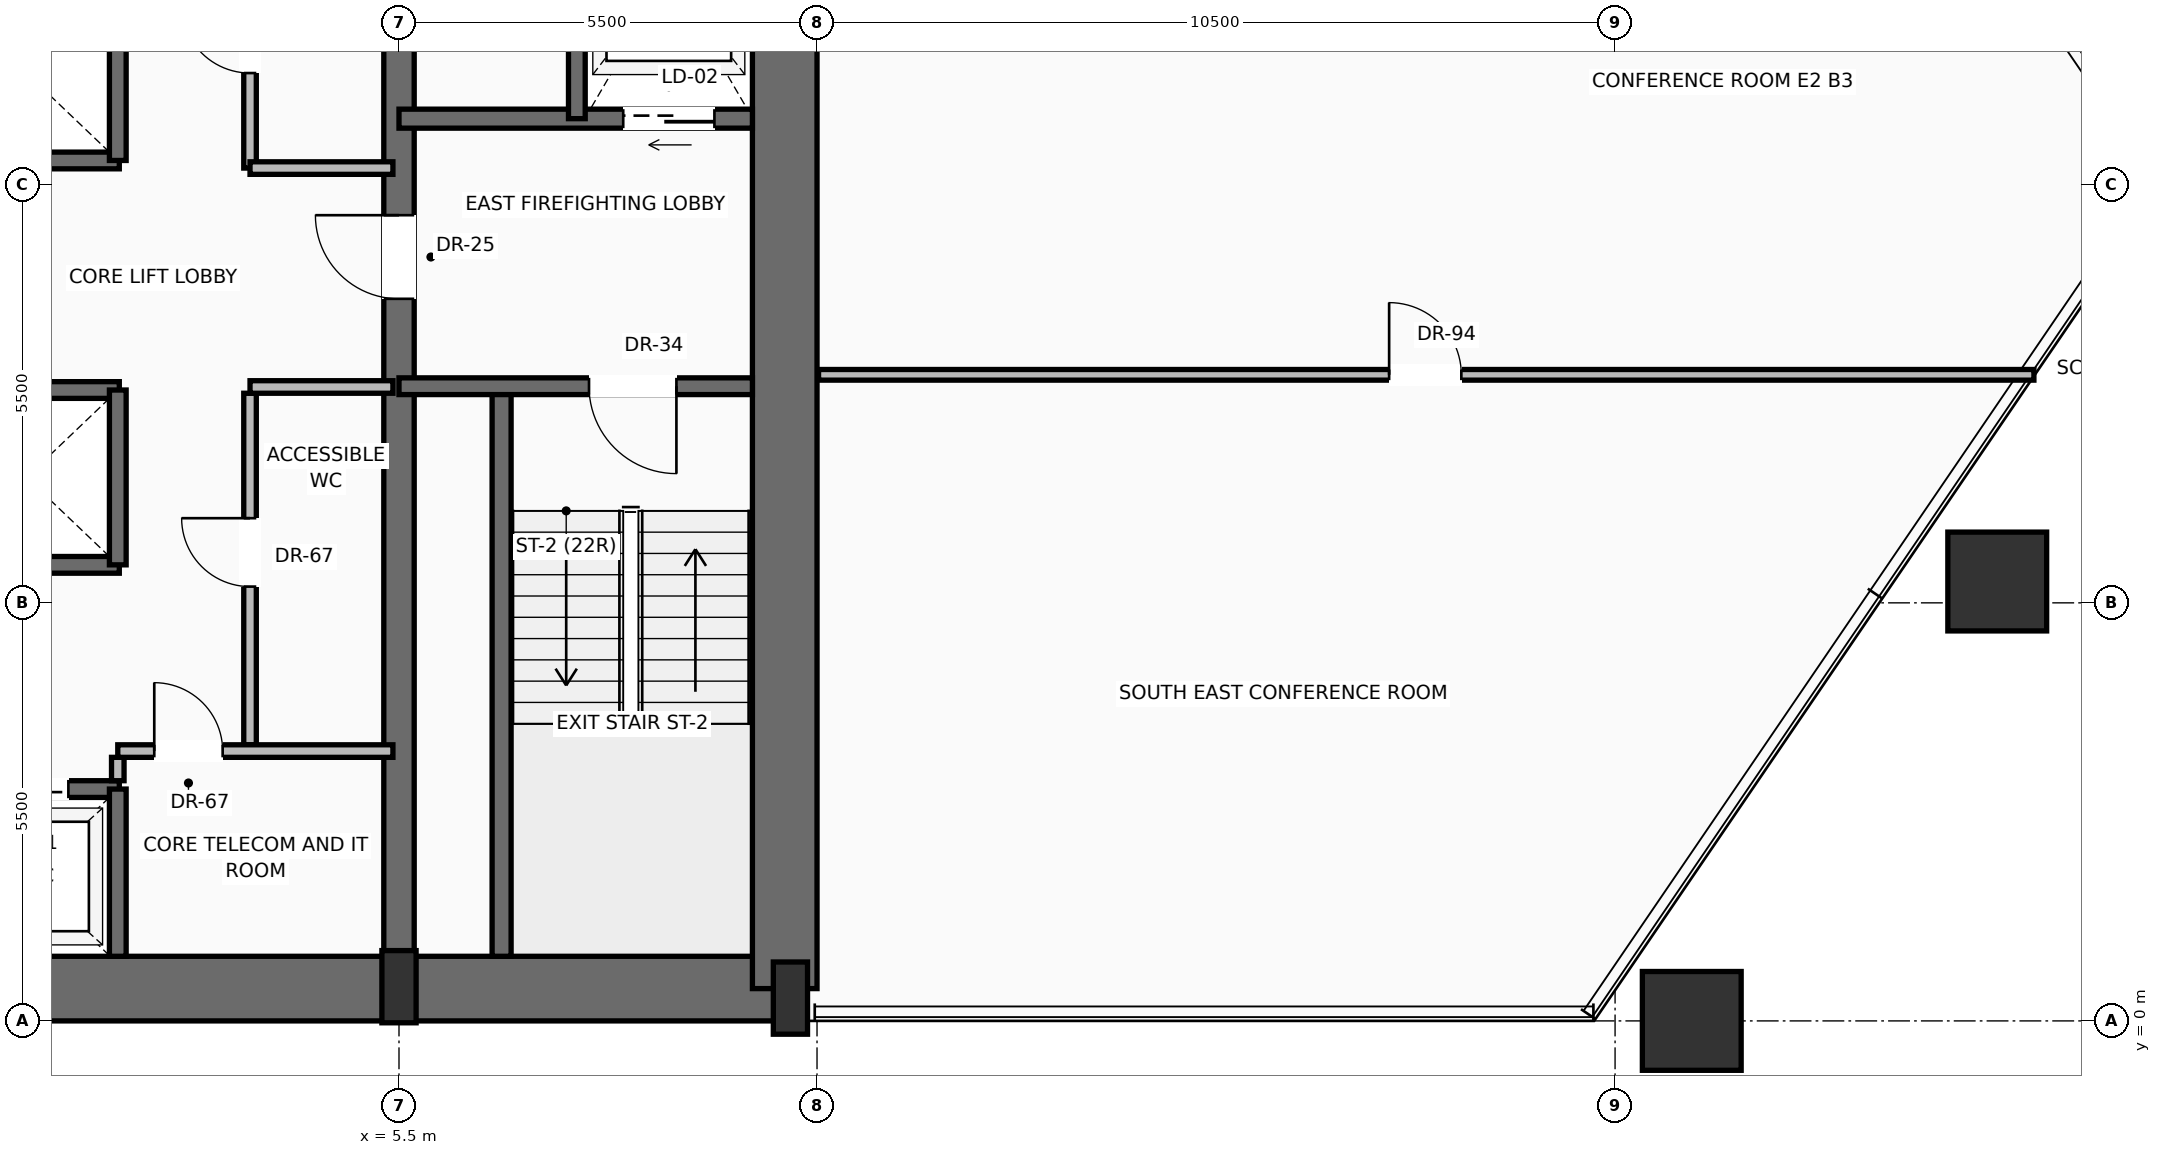
"""IFC4 building model, lengths in metres.
Left out: names, types, materials, properties, quantities, classifications, styles, units other than length and angle.
Written with IfcOpenShell. Run it as: python <this file> out.ifc"""

import sys

from ifc_helpers import new_model, si_unit, direction, frame, frame_2d, origin, origin_2d, place, context, subcontext, project, spatial, rectangle, hollow_rectangle, extrude, source, transform, mapped, element, fill, save


model = new_model("IFC4")
c1 = context("Model", 3, precision=1e-05, world=origin(), true_north=direction((0.0, 1.0)))
c2 = subcontext(c1, "Body", "Model", "MODEL_VIEW")
j1 = project(units=[si_unit("LENGTHUNIT", "METRE"), si_unit("PLANEANGLEUNIT", "RADIAN")], contexts=[c1])
p1 = place(None, origin())
s1 = spatial("IfcSite", under=j1, at=p1, CompositionType="ELEMENT")
p2 = place(p1, origin())
s2 = spatial("IfcBuilding", under=s1, at=p2, CompositionType="ELEMENT")
p3 = place(p2, frame((0.0, 0.0, 31.2)))
s3 = spatial("IfcBuildingStorey", under=s2, at=p3, CompositionType="ELEMENT", Elevation=31.2)
p4 = place(p3, frame((-10.65, 0.425, 0.0), z_axis=(0.0, 0.0, 1.0), x_axis=(1.0, 0.0, 0.0)))
e1 = element("IfcWall", 1, at=p4, inside=s3, PredefinedType="SHEAR", context=c2, shape_type="SweptSolid", body=[
    extrude(rectangle(XDim=21.3, YDim=0.85, at=frame_2d((10.65, 0.0))), origin(), (0.0, 0.0, 1.0), 3.45),
])
p5 = place(p3, frame((10.575, 0.425, 0.0), z_axis=(0.0, 0.0, 1.0), x_axis=(0.0, 1.0, 0.0)))
e2 = element("IfcWall", 2, at=p5, inside=s3, PredefinedType="SHEAR", context=c2, shape_type="SweptSolid", body=[
    extrude(rectangle(XDim=15.75, YDim=0.85, at=frame_2d((7.875, 0.0))), origin(), (0.0, 0.0, 1.0), 3.45),
])
p6 = place(p3, frame((5.5, 0.425, 0.0), z_axis=(0.0, 0.0, 1.0), x_axis=(0.0, 1.0, 0.0)))
e3 = element("IfcWall", 3, at=p6, inside=s3, PredefinedType="SHEAR", context=c2, shape_type="SweptSolid", body=[
    extrude(rectangle(XDim=15.75, YDim=0.4, at=frame_2d((7.875, 0.0))), origin(), (0.0, 0.0, 1.0), 3.45),
])
p7 = place(p6, frame((9.075, 0.0, 0.0)))
e4 = element("IfcOpeningElement", 4, at=p7, cuts=e3, PredefinedType="OPENING", context=c2, shape_type="SweptSolid", body=[
    extrude(rectangle(XDim=1.1, YDim=2.2, at=frame_2d((0.55, 1.1))), frame((0.0, 0.21, 0.0), z_axis=(0.0, -1.0, 0.0), x_axis=(1.0, 0.0, 0.0)), (0.0, 0.0, 1.0), 0.42),
])
m1 = source(origin(), c2, "Body", "SweptSolid", [
    extrude(rectangle(XDim=0.45, YDim=0.95, at=origin_2d()), origin(), (0.0, 0.0, 1.0), 3.7),
])
for number, where, z_axis, x_axis in (
    (5, (5.5, 0.45, 0.0), (0.0, 0.0, 1.0), (1.0, 0.0, 0.0)),
    (6, (10.65, 0.3, 0.0), (0.0, 0.0, 1.0), (1.0, 0.0, 0.0)),
):
    element("IfcColumn", number, at=place(p3, frame(where, z_axis=z_axis, x_axis=x_axis)), inside=s3, PredefinedType="PILASTER", context=c2, shape_type="MappedRepresentation", body=[
        mapped(m1, transform((0.0, 0.0, 0.0), scale=1.0)),
    ])
m2 = source(origin(), c2, "Body", "SweptSolid", [
    extrude(hollow_rectangle(XDim=1.3, YDim=1.3, WallThickness=0.065, at=origin_2d()), origin(), (0.0, 0.0, 1.0), 3.692),
])
for number, where, z_axis, x_axis in (
    (7, (22.509, 0.0, 0.004), (0.017, 0.0, 1.0), (0.0, 1.0, 0.0)),
    (8, (26.528, 5.781, 0.004), (0.005, -0.017, 1.0), (0.961, 0.275, 0.0)),
):
    element("IfcColumn", number, at=place(p3, frame(where, z_axis=z_axis, x_axis=x_axis)), inside=s3, PredefinedType="COLUMN", context=c2, shape_type="MappedRepresentation", body=[
        mapped(m2, transform((0.0, 0.0, 0.0), scale=1.0)),
    ])
p8 = place(p3, frame((6.85, 0.85, 0.0), z_axis=(0.0, 0.0, 1.0), x_axis=(0.0, 1.0, 0.0)))
e9 = element("IfcWall", 9, at=p8, inside=s3, PredefinedType="SOLIDWALL", context=c2, shape_type="SweptSolid", body=[
    extrude(rectangle(XDim=7.5, YDim=0.25, at=frame_2d((3.75, 0.0))), origin(), (0.0, 0.0, 1.0), 3.45),
])
p9 = place(p3, frame((10.15, 8.35, 0.0), z_axis=(0.0, 0.0, 1.0), x_axis=(-1.0, 0.0, 0.0)))
e10 = element("IfcWall", 10, at=p9, inside=s3, PredefinedType="SOLIDWALL", context=c2, shape_type="SweptSolid", body=[
    extrude(rectangle(XDim=4.65, YDim=0.22, at=frame_2d((2.325, 0.0))), origin(), (0.0, 0.0, 1.0), 3.45),
])
p10 = place(p9, frame((1.0, 0.0, 0.0)))
e11 = element("IfcOpeningElement", 11, at=p10, cuts=e10, PredefinedType="OPENING", context=c2, shape_type="SweptSolid", body=[
    extrude(rectangle(XDim=1.15, YDim=2.2, at=frame_2d((0.575, 1.1))), frame((0.0, 0.12, 0.0), z_axis=(0.0, -1.0, 0.0), x_axis=(1.0, 0.0, 0.0)), (0.0, 0.0, 1.0), 0.24),
])
p11 = place(p3, frame((10.15, 11.87, 0.0), z_axis=(0.0, 0.0, 1.0), x_axis=(-1.0, 0.0, 0.0)))
e12 = element("IfcWall", 12, at=p11, inside=s3, PredefinedType="SOLIDWALL", context=c2, shape_type="SweptSolid", body=[
    extrude(rectangle(XDim=4.65, YDim=0.25, at=frame_2d((2.325, 0.0))), origin(), (0.0, 0.0, 1.0), 3.45),
])
p12 = place(p11, frame((0.5, 0.0, 0.0)))
e13 = element("IfcOpeningElement", 13, at=p12, cuts=e12, PredefinedType="OPENING", context=c2, shape_type="SweptSolid", body=[
    extrude(rectangle(XDim=1.2, YDim=2.25, at=frame_2d((0.6, 1.125))), frame((0.0, 0.135, 0.0), z_axis=(0.0, -1.0, 0.0), x_axis=(1.0, 0.0, 0.0)), (0.0, 0.0, 1.0), 0.27),
])
p13 = place(p3, frame((7.84, 11.87, 0.0), z_axis=(0.0, 0.0, 1.0), x_axis=(0.0, 1.0, 0.0)))
e14 = element("IfcWall", 14, at=p13, inside=s3, PredefinedType="SOLIDWALL", context=c2, shape_type="SweptSolid", body=[
    extrude(rectangle(XDim=3.88, YDim=0.22, at=frame_2d((1.94, 0.0))), origin(), (0.0, 0.0, 1.0), 3.45),
])
p14 = place(p3, frame((-5.5, 3.05, 0.0), z_axis=(0.0, 0.0, 1.0), x_axis=(1.0, 0.0, 0.0)))
e15 = element("IfcWall", 15, at=p14, inside=s3, PredefinedType="SOLIDWALL", context=c2, shape_type="SweptSolid", body=[
    extrude(rectangle(XDim=7.32, YDim=0.22, at=frame_2d((3.66, 0.0))), origin(), (0.0, 0.0, 1.0), 3.45),
])
p15 = place(p14, frame((0.75, 0.0, 0.0)))
e16 = element("IfcOpeningElement", 16, at=p15, cuts=e15, PredefinedType="OPENING", context=c2, shape_type="SweptSolid", body=[
    extrude(rectangle(XDim=1.1, YDim=2.2, at=frame_2d((0.55, 1.1))), frame((0.0, 0.12, 0.0), z_axis=(0.0, -1.0, 0.0), x_axis=(1.0, 0.0, 0.0)), (0.0, 0.0, 1.0), 0.24),
])
p16 = place(p14, frame((3.15, 0.0, 0.0)))
e17 = element("IfcOpeningElement", 17, at=p16, cuts=e15, PredefinedType="OPENING", context=c2, shape_type="SweptSolid", body=[
    extrude(rectangle(XDim=1.1, YDim=2.2, at=frame_2d((0.55, 1.1))), frame((0.0, 0.12, 0.0), z_axis=(0.0, -1.0, 0.0), x_axis=(1.0, 0.0, 0.0)), (0.0, 0.0, 1.0), 0.24),
])
p17 = place(p14, frame((5.55, 0.0, 0.0)))
e18 = element("IfcOpeningElement", 18, at=p17, cuts=e15, PredefinedType="OPENING", context=c2, shape_type="SweptSolid", body=[
    extrude(rectangle(XDim=1.1, YDim=2.2, at=frame_2d((0.55, 1.1))), frame((0.0, 0.12, 0.0), z_axis=(0.0, -1.0, 0.0), x_axis=(1.0, 0.0, 0.0)), (0.0, 0.0, 1.0), 0.24),
])
p18 = place(p3, frame((1.8, 0.85, 0.0), z_axis=(0.0, 0.0, 1.0), x_axis=(0.0, 1.0, 0.0)))
e19 = element("IfcWall", 19, at=p18, inside=s3, PredefinedType="SOLIDWALL", context=c2, shape_type="SweptSolid", body=[
    extrude(rectangle(XDim=2.2, YDim=0.22, at=frame_2d((1.1, 0.0))), origin(), (0.0, 0.0, 1.0), 3.45),
])
p19 = place(p3, frame((1.8, 3.16, 0.0), z_axis=(0.0, 0.0, 1.0), x_axis=(0.0, 1.0, 0.0)))
e20 = element("IfcWall", 20, at=p19, inside=s3, PredefinedType="PARTITIONING", context=c2, shape_type="SweptSolid", body=[
    extrude(rectangle(XDim=0.308, YDim=0.165, at=frame_2d((0.154, 0.0))), origin(), (0.0, 0.0, 1.0), 3.442),
])
p20 = place(p3, frame((3.54, 3.633, 0.0), z_axis=(0.0, 0.0, 1.0), x_axis=(0.0, 1.0, 0.0)))
e21 = element("IfcWall", 21, at=p20, inside=s3, PredefinedType="PARTITIONING", context=c2, shape_type="SweptSolid", body=[
    extrude(rectangle(XDim=4.625, YDim=0.165, at=frame_2d((2.312, 0.0))), origin(), (0.0, 0.0, 1.0), 3.442),
])
p21 = place(p20, frame((2.081, 0.0, 0.0)))
e22 = element("IfcOpeningElement", 22, at=p21, cuts=e21, PredefinedType="OPENING", context=c2, shape_type="SweptSolid", body=[
    extrude(rectangle(XDim=0.9, YDim=2.1, at=frame_2d((0.45, 1.05))), frame((0.0, 0.093, 0.0), z_axis=(0.0, -1.0, 0.0), x_axis=(1.0, 0.0, 0.0)), (0.0, 0.0, 1.0), 0.185),
])
p22 = place(p3, frame((3.54, 8.34, 0.0), z_axis=(0.0, 0.0, 1.0), x_axis=(1.0, 0.0, 0.0)))
e23 = element("IfcWall", 23, at=p22, inside=s3, PredefinedType="PARTITIONING", context=c2, shape_type="SweptSolid", body=[
    extrude(rectangle(XDim=1.88, YDim=0.165, at=frame_2d((0.94, 0.0))), origin(), (0.0, 0.0, 1.0), 3.442),
])
p23 = place(p3, frame((1.8, 3.55, 0.0), z_axis=(0.0, 0.0, 1.0), x_axis=(1.0, 0.0, 0.0)))
e24 = element("IfcWall", 24, at=p23, inside=s3, PredefinedType="PARTITIONING", context=c2, shape_type="SweptSolid", body=[
    extrude(rectangle(XDim=3.62, YDim=0.165, at=frame_2d((1.81, 0.0))), origin(), (0.0, 0.0, 1.0), 3.442),
])
p24 = place(p23, frame((0.48, 0.0, 0.0)))
e25 = element("IfcOpeningElement", 25, at=p24, cuts=e24, PredefinedType="OPENING", context=c2, shape_type="SweptSolid", body=[
    extrude(rectangle(XDim=0.9, YDim=2.1, at=frame_2d((0.45, 1.05))), frame((0.0, 0.093, 0.0), z_axis=(0.0, -1.0, 0.0), x_axis=(1.0, 0.0, 0.0)), (0.0, 0.0, 1.0), 0.185),
])
for number, where, z_axis, x_axis in (
    (26, (-5.5, 6.0, 0.0), (0.0, 0.0, 1.0), (1.0, 0.0, 0.0)),
    (27, (-5.5, 8.3, 0.0), (0.0, 0.0, 1.0), (1.0, 0.0, 0.0)),
):
    element("IfcWall", number, at=place(p3, frame(where, z_axis=z_axis, x_axis=x_axis)), inside=s3, PredefinedType="SOLIDWALL", context=c2, shape_type="SweptSolid", body=[
        extrude(rectangle(XDim=7.32, YDim=0.22, at=frame_2d((3.66, 0.0))), origin(), (0.0, 0.0, 1.0), 3.45),
    ])
p25 = place(p3, frame((1.8, 6.0, 0.0), z_axis=(0.0, 0.0, 1.0), x_axis=(0.0, 1.0, 0.0)))
e28 = element("IfcWall", 28, at=p25, inside=s3, PredefinedType="SOLIDWALL", context=c2, shape_type="SweptSolid", body=[
    extrude(rectangle(XDim=2.3, YDim=0.22, at=frame_2d((1.15, 0.0))), origin(), (0.0, 0.0, 1.0), 3.45),
])
p26 = place(p3, frame((-5.5, 11.32, 0.0), z_axis=(0.0, 0.0, 1.0), x_axis=(1.0, 0.0, 0.0)))
e29 = element("IfcWall", 29, at=p26, inside=s3, PredefinedType="SOLIDWALL", context=c2, shape_type="SweptSolid", body=[
    extrude(rectangle(XDim=7.32, YDim=0.22, at=frame_2d((3.66, 0.0))), origin(), (0.0, 0.0, 1.0), 3.45),
])
p27 = place(p3, frame((1.8, 11.32, 0.0), z_axis=(0.0, 0.0, 1.0), x_axis=(0.0, 1.0, 0.0)))
e30 = element("IfcWall", 30, at=p27, inside=s3, PredefinedType="SOLIDWALL", context=c2, shape_type="SweptSolid", body=[
    extrude(rectangle(XDim=2.3, YDim=0.22, at=frame_2d((1.15, 0.0))), origin(), (0.0, 0.0, 1.0), 3.45),
])
p28 = place(p3, frame((3.54, 11.22, 0.0), z_axis=(0.0, 0.0, 1.0), x_axis=(0.0, 1.0, 0.0)))
e31 = element("IfcWall", 31, at=p28, inside=s3, PredefinedType="PARTITIONING", context=c2, shape_type="SweptSolid", body=[
    extrude(rectangle(XDim=4.53, YDim=0.165, at=frame_2d((2.265, 0.0))), origin(), (0.0, 0.0, 1.0), 3.442),
])
p29 = place(p28, frame((1.25, 0.0, 0.0)))
e32 = element("IfcOpeningElement", 32, at=p29, cuts=e31, PredefinedType="OPENING", context=c2, shape_type="SweptSolid", body=[
    extrude(rectangle(XDim=0.9, YDim=2.1, at=frame_2d((0.45, 1.05))), frame((0.0, 0.093, 0.0), z_axis=(0.0, -1.0, 0.0), x_axis=(1.0, 0.0, 0.0)), (0.0, 0.0, 1.0), 0.185),
])
p30 = place(p3, frame((3.54, 11.22, 0.0), z_axis=(0.0, 0.0, 1.0), x_axis=(1.0, 0.0, 0.0)))
e33 = element("IfcWall", 33, at=p30, inside=s3, PredefinedType="PARTITIONING", context=c2, shape_type="SweptSolid", body=[
    extrude(rectangle(XDim=1.88, YDim=0.165, at=frame_2d((0.94, 0.0))), origin(), (0.0, 0.0, 1.0), 3.442),
])
p31 = place(p3, frame((11.02, 8.5, 0.0), z_axis=(0.0, 0.0, 1.0), x_axis=(1.0, 0.0, 0.0)))
e34 = element("IfcWall", 34, at=p31, inside=s3, PredefinedType="PARTITIONING", context=c2, shape_type="SweptSolid", body=[
    extrude(rectangle(XDim=15.99, YDim=0.14, at=frame_2d((7.995, 0.0))), origin(), (0.0, 0.0, 1.0), 3.442),
])
p32 = place(p31, frame((7.507, 0.0, 0.0)))
e35 = element("IfcOpeningElement", 35, at=p32, cuts=e34, PredefinedType="OPENING", context=c2, shape_type="SweptSolid", body=[
    extrude(rectangle(XDim=0.95, YDim=2.2, at=frame_2d((0.475, 1.1))), frame((0.0, 0.08, 0.0), z_axis=(0.0, -1.0, 0.0), x_axis=(1.0, 0.0, 0.0)), (0.0, 0.0, 1.0), 0.16),
])
m3 = source(origin(), c2, "Body", "SweptSolid", [
    extrude(rectangle(XDim=1.15, YDim=2.2, at=frame_2d((0.575, 1.1))), frame((0.0, 0.025, 0.0), z_axis=(0.0, -1.0, 0.0), x_axis=(1.0, 0.0, 0.0)), (0.0, 0.0, 1.0), 0.05),
])
p33 = place(p10, origin())
e36 = element("IfcDoor", 36, at=p33, inside=s3, OperationType="SINGLE_SWING_LEFT", PredefinedType="DOOR", context=c2, shape_type="MappedRepresentation", body=[
    mapped(m3, transform((0.0, 0.0, 0.0), scale=1.0)),
])
fill(e11, e36)
m4 = source(origin(), c2, "Body", "SweptSolid", [
    extrude(rectangle(XDim=1.1, YDim=2.2, at=frame_2d((0.55, 1.1))), frame((0.0, 0.025, 0.0), z_axis=(0.0, -1.0, 0.0), x_axis=(1.0, 0.0, 0.0)), (0.0, 0.0, 1.0), 0.05),
])
p34 = place(p7, origin())
e37 = element("IfcDoor", 37, at=p34, inside=s3, OperationType="SINGLE_SWING_RIGHT", PredefinedType="DOOR", context=c2, shape_type="MappedRepresentation", body=[
    mapped(m4, transform((0.0, 0.0, 0.0), scale=1.0)),
])
fill(e4, e37)
m5 = source(origin(), c2, "Body", "SweptSolid", [
    extrude(rectangle(XDim=1.2, YDim=2.25, at=frame_2d((0.6, 1.125))), frame((0.0, 0.025, 0.0), z_axis=(0.0, -1.0, 0.0), x_axis=(1.0, 0.0, 0.0)), (0.0, 0.0, 1.0), 0.05),
])
p35 = place(p12, origin())
e38 = element("IfcDoor", 38, at=p35, inside=s3, OperationType="SLIDING_TO_RIGHT", PredefinedType="DOOR", context=c2, shape_type="MappedRepresentation", body=[
    mapped(m5, transform((0.0, 0.0, 0.0), scale=1.0)),
])
fill(e13, e38)
m6 = source(origin(), c2, "Body", "SweptSolid", [
    extrude(rectangle(XDim=1.1, YDim=2.2, at=frame_2d((0.55, 1.1))), frame((0.0, 0.025, 0.0), z_axis=(0.0, -1.0, 0.0), x_axis=(1.0, 0.0, 0.0)), (0.0, 0.0, 1.0), 0.05),
])
p36 = place(p17, origin())
e39 = element("IfcDoor", 39, at=p36, inside=s3, OperationType="SLIDING_TO_RIGHT", PredefinedType="DOOR", context=c2, shape_type="MappedRepresentation", body=[
    mapped(m6, transform((0.0, 0.0, 0.0), scale=1.0)),
])
fill(e18, e39)
m7 = source(origin(), c2, "Body", "SweptSolid", [
    extrude(rectangle(XDim=0.9, YDim=2.1, at=frame_2d((0.45, 1.05))), frame((0.0, 0.025, 0.0), z_axis=(0.0, -1.0, 0.0), x_axis=(1.0, 0.0, 0.0)), (0.0, 0.0, 1.0), 0.05),
])
p37 = place(p24, origin())
e40 = element("IfcDoor", 40, at=p37, inside=s3, OperationType="SINGLE_SWING_LEFT", PredefinedType="DOOR", context=c2, shape_type="MappedRepresentation", body=[
    mapped(m7, transform((0.0, 0.0, 0.0), scale=1.0)),
])
fill(e25, e40)
p38 = place(p21, origin())
e41 = element("IfcDoor", 41, at=p38, inside=s3, OperationType="SINGLE_SWING_RIGHT", PredefinedType="DOOR", context=c2, shape_type="MappedRepresentation", body=[
    mapped(m7, transform((0.0, 0.0, 0.0), scale=1.0)),
])
fill(e22, e41)
p39 = place(p29, origin())
e42 = element("IfcDoor", 42, at=p39, inside=s3, OperationType="SINGLE_SWING_RIGHT", PredefinedType="DOOR", context=c2, shape_type="MappedRepresentation", body=[
    mapped(m7, transform((0.0, 0.0, 0.0), scale=1.0)),
])
fill(e32, e42)
m8 = source(origin(), c2, "Body", "SweptSolid", [
    extrude(rectangle(XDim=0.95, YDim=2.2, at=frame_2d((0.475, 1.1))), frame((0.0, 0.025, 0.0), z_axis=(0.0, -1.0, 0.0), x_axis=(1.0, 0.0, 0.0)), (0.0, 0.0, 1.0), 0.05),
])
p40 = place(p32, origin())
e43 = element("IfcDoor", 43, at=p40, inside=s3, OperationType="SINGLE_SWING_LEFT", PredefinedType="DOOR", context=c2, shape_type="MappedRepresentation", body=[
    mapped(m8, transform((0.0, 0.0, 0.0), scale=1.0)),
])
fill(e35, e43)
save(model, sys.argv[1])
